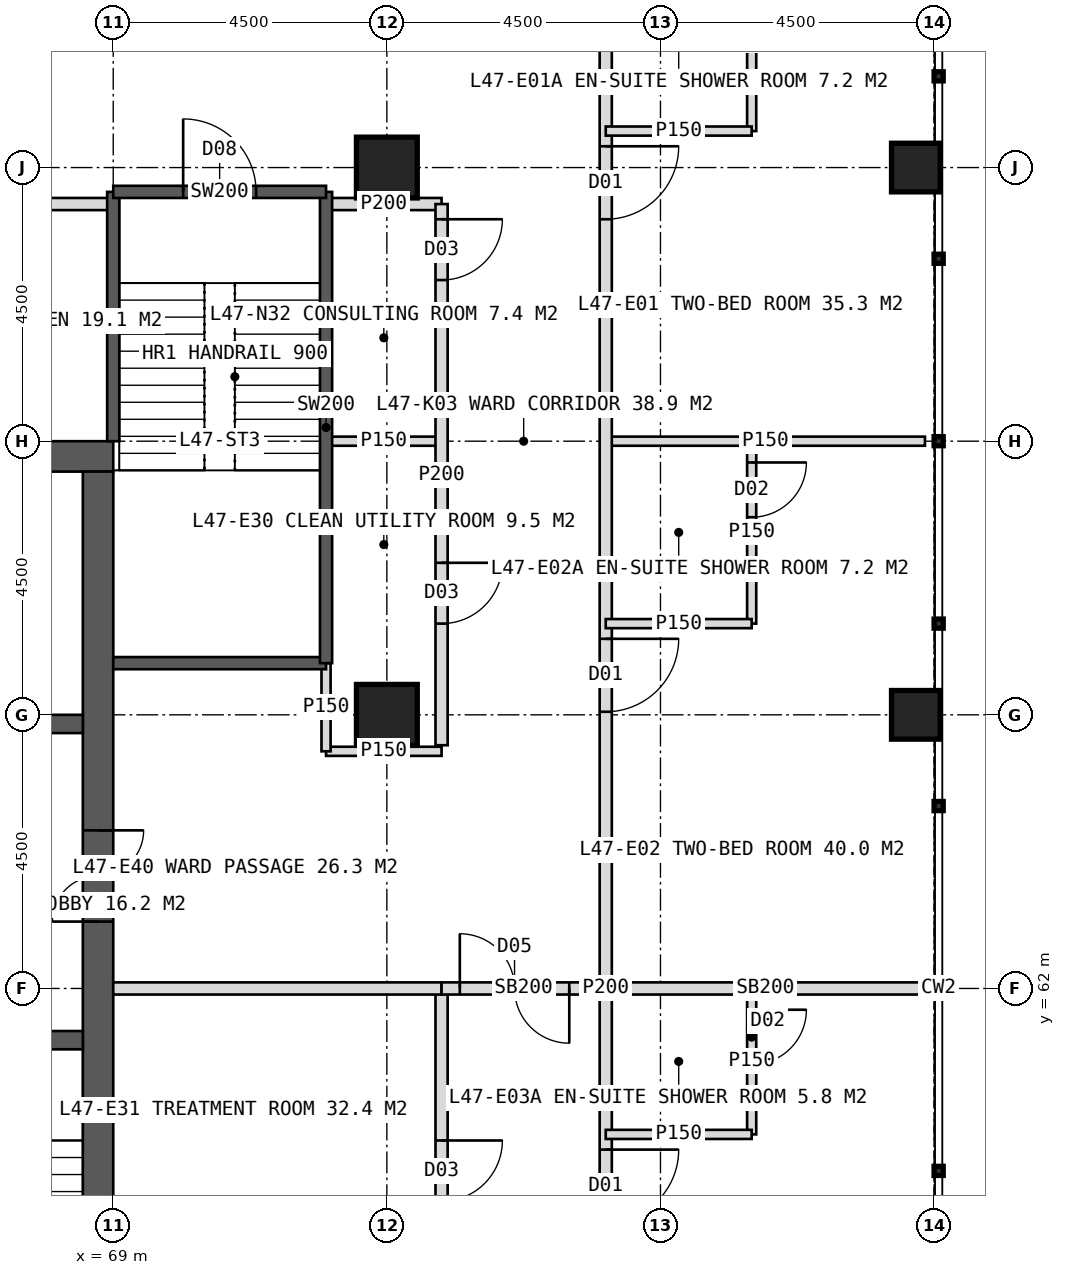
"""IFC4 building model, lengths in metres.
Left out: names, types, materials, properties, quantities, classifications, styles, units other than length and angle.
Written with IfcOpenShell. Run it as: python <this file> out.ifc"""

import sys

from ifc_helpers import new_model, si_unit, direction, frame, frame_2d, origin, origin_2d, place, context, subcontext, project, spatial, rectangle, hollow_rectangle, extrude, element, fill, save


model = new_model("IFC4")
c1 = context("Model", 3, precision=1e-05, world=origin(), true_north=direction((0.0, 1.0)))
c2 = subcontext(c1, "Body", "Model", "MODEL_VIEW")
j1 = project(units=[si_unit("LENGTHUNIT", "METRE"), si_unit("PLANEANGLEUNIT", "RADIAN")], contexts=[c1])
p1 = place(None, origin())
s1 = spatial("IfcSite", under=j1, at=p1, CompositionType="ELEMENT")
p2 = place(p1, origin())
s2 = spatial("IfcBuilding", under=s1, at=p2, CompositionType="ELEMENT")
p3 = place(p2, frame((0.0, 0.0, 197.0)))
s3 = spatial("IfcBuildingStorey", under=s2, at=p3, CompositionType="ELEMENT", Elevation=197.0)
p4 = place(p3, frame((51.0, 70.75, 0.0), z_axis=(0.0, 0.0, 1.0), x_axis=(1.0, 0.0, 0.0)))
e1 = element("IfcWall", 1, at=p4, inside=s3, PredefinedType="SHEAR", context=c2, shape_type="SweptSolid", body=[
    extrude(rectangle(XDim=18.0, YDim=0.5, at=frame_2d((9.0, 0.0))), origin(), (0.0, 0.0, 1.0), 4.0),
])
p5 = place(p4, frame((8.1, 0.0, 0.0)))
e2 = element("IfcOpeningElement", 2, at=p5, cuts=e1, PredefinedType="OPENING", context=c2, shape_type="SweptSolid", body=[
    extrude(rectangle(XDim=1.8, YDim=2.2, at=frame_2d((0.9, 1.1))), frame((0.0, 0.26, 0.0), z_axis=(0.0, -1.0, 0.0), x_axis=(1.0, 0.0, 0.0)), (0.0, 0.0, 1.0), 0.52),
])
p6 = place(p3, frame((68.75, 53.5, 0.0), z_axis=(0.0, 0.0, 1.0), x_axis=(0.0, 1.0, 0.0)))
e3 = element("IfcWall", 3, at=p6, inside=s3, PredefinedType="SHEAR", context=c2, shape_type="SweptSolid", body=[
    extrude(rectangle(XDim=17.0, YDim=0.5, at=frame_2d((8.5, 0.0))), origin(), (0.0, 0.0, 1.0), 4.0),
])
p7 = place(p6, frame((9.6, 0.0, 0.0)))
e4 = element("IfcOpeningElement", 4, at=p7, cuts=e3, PredefinedType="OPENING", context=c2, shape_type="SweptSolid", body=[
    extrude(rectangle(XDim=1.5, YDim=2.2, at=frame_2d((0.75, 1.1))), frame((0.0, 0.26, 0.0), z_axis=(0.0, -1.0, 0.0), x_axis=(1.0, 0.0, 0.0)), (0.0, 0.0, 1.0), 0.52),
])
p8 = place(p3, frame((65.2, 61.15, 0.0), z_axis=(0.0, 0.0, 1.0), x_axis=(1.0, 0.0, 0.0)))
e5 = element("IfcWall", 5, at=p8, inside=s3, PredefinedType="SHEAR", context=c2, shape_type="SweptSolid", body=[
    extrude(rectangle(XDim=3.3, YDim=0.3, at=frame_2d((1.65, 0.0))), origin(), (0.0, 0.0, 1.0), 4.0),
])
p9 = place(p8, frame((1.05, 0.0, 0.0)))
e6 = element("IfcOpeningElement", 6, at=p9, cuts=e5, PredefinedType="OPENING", context=c2, shape_type="SweptSolid", body=[
    extrude(rectangle(XDim=1.2, YDim=2.1, at=frame_2d((0.6, 1.05))), frame((0.0, 0.16, 0.0), z_axis=(0.0, -1.0, 0.0), x_axis=(1.0, 0.0, 0.0)), (0.0, 0.0, 1.0), 0.32),
])
p10 = place(p3, frame((65.2, 66.35, 0.0), z_axis=(0.0, 0.0, 1.0), x_axis=(1.0, 0.0, 0.0)))
e7 = element("IfcWall", 7, at=p10, inside=s3, PredefinedType="SHEAR", context=c2, shape_type="SweptSolid", body=[
    extrude(rectangle(XDim=3.3, YDim=0.3, at=frame_2d((1.65, 0.0))), origin(), (0.0, 0.0, 1.0), 4.0),
])
p11 = place(p10, frame((1.05, 0.0, 0.0)))
e8 = element("IfcOpeningElement", 8, at=p11, cuts=e7, PredefinedType="OPENING", context=c2, shape_type="SweptSolid", body=[
    extrude(rectangle(XDim=1.2, YDim=2.2, at=frame_2d((0.6, 1.1))), frame((0.0, 0.16, 0.0), z_axis=(0.0, -1.0, 0.0), x_axis=(1.0, 0.0, 0.0)), (0.0, 0.0, 1.0), 0.32),
])
for number, where, z_axis, x_axis in (
    (9, (73.5, 75.5, 0.0), (0.0, 0.0, 1.0), (1.0, 0.0, 0.0)),
    (10, (73.5, 66.5, 0.0), (0.0, 0.0, 1.0), (1.0, 0.0, 0.0)),
):
    element("IfcColumn", number, at=place(p3, frame(where, z_axis=z_axis, x_axis=x_axis)), inside=s3, PredefinedType="COLUMN", context=c2, shape_type="SweptSolid", body=[
        extrude(hollow_rectangle(XDim=1.0, YDim=1.0, WallThickness=0.1, at=origin_2d()), origin(), (0.0, 0.0, 1.0), 4.0),
    ])
for number, where, z_axis, x_axis in (
    (11, (82.2, 66.5, 0.0), (0.0, 0.0, 1.0), (1.0, 0.0, 0.0)),
    (12, (82.2, 75.5, 0.0), (0.0, 0.0, 1.0), (1.0, 0.0, 0.0)),
):
    element("IfcColumn", number, at=place(p3, frame(where, z_axis=z_axis, x_axis=x_axis)), inside=s3, PredefinedType="COLUMN", context=c2, shape_type="SweptSolid", body=[
        extrude(hollow_rectangle(XDim=0.8, YDim=0.8, WallThickness=0.08, at=origin_2d()), origin(), (0.0, 0.0, 1.0), 4.0),
    ])
p12 = place(p3, frame((62.25, 74.9, 0.0), z_axis=(0.0, 0.0, 1.0), x_axis=(1.0, 0.0, 0.0)))
e13 = element("IfcWall", 13, at=p12, inside=s3, PredefinedType="PARTITIONING", context=c2, shape_type="SweptSolid", body=[
    extrude(rectangle(XDim=6.75, YDim=0.2, at=frame_2d((3.375, 0.0))), origin(), (0.0, 0.0, 1.0), 3.75),
])
p13 = place(p12, frame((4.3, 0.0, 0.0)))
e14 = element("IfcOpeningElement", 14, at=p13, cuts=e13, PredefinedType="OPENING", context=c2, shape_type="SweptSolid", body=[
    extrude(rectangle(XDim=1.0, YDim=2.1, at=frame_2d((0.5, 1.05))), frame((0.0, 0.11, 0.0), z_axis=(0.0, -1.0, 0.0), x_axis=(1.0, 0.0, 0.0)), (0.0, 0.0, 1.0), 0.22),
])
p14 = place(p3, frame((72.5, 74.9, 0.0), z_axis=(0.0, 0.0, 1.0), x_axis=(1.0, 0.0, 0.0)))
e15 = element("IfcWall", 15, at=p14, inside=s3, PredefinedType="PARTITIONING", context=c2, shape_type="SweptSolid", body=[
    extrude(rectangle(XDim=1.9, YDim=0.2, at=frame_2d((0.95, 0.0))), origin(), (0.0, 0.0, 1.0), 3.75),
])
p15 = place(p3, frame((77.1, 71.0, 0.0), z_axis=(0.0, 0.0, 1.0), x_axis=(1.0, 0.0, 0.0)))
e16 = element("IfcWall", 16, at=p15, inside=s3, PredefinedType="PARTITIONING", context=c2, shape_type="SweptSolid", body=[
    extrude(rectangle(XDim=5.25, YDim=0.15, at=frame_2d((2.625, 0.0))), origin(), (0.0, 0.0, 1.0), 3.75),
])
p16 = place(p3, frame((77.1, 62.0, 0.0), z_axis=(0.0, 0.0, 1.0), x_axis=(1.0, 0.0, 0.0)))
e17 = element("IfcWall", 17, at=p16, inside=s3, PredefinedType="SOLIDWALL", context=c2, shape_type="SweptSolid", body=[
    extrude(rectangle(XDim=5.25, YDim=0.2, at=frame_2d((2.625, 0.0))), origin(), (0.0, 0.0, 1.0), 2.95),
])
p17 = place(p3, frame((77.1, 79.1, 0.0), z_axis=(0.0, 0.0, 1.0), x_axis=(0.0, -1.0, 0.0)))
e18 = element("IfcWall", 18, at=p17, inside=s3, PredefinedType="PARTITIONING", context=c2, shape_type="SweptSolid", body=[
    extrude(rectangle(XDim=34.2, YDim=0.2, at=frame_2d((17.1, 0.0))), origin(), (0.0, 0.0, 1.0), 3.75),
])
p18 = place(p17, frame((3.25, 0.0, 0.0)))
e19 = element("IfcOpeningElement", 19, at=p18, cuts=e18, PredefinedType="OPENING", context=c2, shape_type="SweptSolid", body=[
    extrude(rectangle(XDim=1.2, YDim=2.2, at=frame_2d((0.6, 1.1))), frame((0.0, 0.11, 0.0), z_axis=(0.0, -1.0, 0.0), x_axis=(1.0, 0.0, 0.0)), (0.0, 0.0, 1.0), 0.22),
])
p19 = place(p17, frame((11.35, 0.0, 0.0)))
e20 = element("IfcOpeningElement", 20, at=p19, cuts=e18, PredefinedType="OPENING", context=c2, shape_type="SweptSolid", body=[
    extrude(rectangle(XDim=1.2, YDim=2.2, at=frame_2d((0.6, 1.1))), frame((0.0, 0.11, 0.0), z_axis=(0.0, -1.0, 0.0), x_axis=(1.0, 0.0, 0.0)), (0.0, 0.0, 1.0), 0.22),
])
p20 = place(p17, frame((19.75, 0.0, 0.0)))
e21 = element("IfcOpeningElement", 21, at=p20, cuts=e18, PredefinedType="OPENING", context=c2, shape_type="SweptSolid", body=[
    extrude(rectangle(XDim=1.2, YDim=2.2, at=frame_2d((0.6, 1.1))), frame((0.0, 0.11, 0.0), z_axis=(0.0, -1.0, 0.0), x_axis=(1.0, 0.0, 0.0)), (0.0, 0.0, 1.0), 0.22),
])
p21 = place(p17, frame((25.75, 0.0, 0.0)))
e22 = element("IfcOpeningElement", 22, at=p21, cuts=e18, PredefinedType="OPENING", context=c2, shape_type="SweptSolid", body=[
    extrude(rectangle(XDim=1.2, YDim=2.2, at=frame_2d((0.6, 1.1))), frame((0.0, 0.11, 0.0), z_axis=(0.0, -1.0, 0.0), x_axis=(1.0, 0.0, 0.0)), (0.0, 0.0, 1.0), 0.22),
])
p22 = place(p3, frame((79.5, 79.1, 0.0), z_axis=(0.0, 0.0, 1.0), x_axis=(0.0, -1.0, 0.0)))
e23 = element("IfcWall", 23, at=p22, inside=s3, PredefinedType="PARTITIONING", context=c2, shape_type="SweptSolid", body=[
    extrude(rectangle(XDim=3.0, YDim=0.15, at=frame_2d((1.5, 0.0))), origin(), (0.0, 0.0, 1.0), 3.75),
])
p23 = place(p22, frame((0.35, 0.0, 0.0)))
e24 = element("IfcOpeningElement", 24, at=p23, cuts=e23, PredefinedType="OPENING", context=c2, shape_type="SweptSolid", body=[
    extrude(rectangle(XDim=0.9, YDim=2.1, at=frame_2d((0.45, 1.05))), frame((0.0, 0.085, 0.0), z_axis=(0.0, -1.0, 0.0), x_axis=(1.0, 0.0, 0.0)), (0.0, 0.0, 1.0), 0.17),
])
p24 = place(p3, frame((77.1, 76.1, 0.0), z_axis=(0.0, 0.0, 1.0), x_axis=(1.0, 0.0, 0.0)))
e25 = element("IfcWall", 25, at=p24, inside=s3, PredefinedType="PARTITIONING", context=c2, shape_type="SweptSolid", body=[
    extrude(rectangle(XDim=2.4, YDim=0.15, at=frame_2d((1.2, 0.0))), origin(), (0.0, 0.0, 1.0), 3.75),
])
p25 = place(p3, frame((79.5, 71.0, 0.0), z_axis=(0.0, 0.0, 1.0), x_axis=(0.0, -1.0, 0.0)))
e26 = element("IfcWall", 26, at=p25, inside=s3, PredefinedType="PARTITIONING", context=c2, shape_type="SweptSolid", body=[
    extrude(rectangle(XDim=3.0, YDim=0.15, at=frame_2d((1.5, 0.0))), origin(), (0.0, 0.0, 1.0), 3.75),
])
p26 = place(p25, frame((0.35, 0.0, 0.0)))
e27 = element("IfcOpeningElement", 27, at=p26, cuts=e26, PredefinedType="OPENING", context=c2, shape_type="SweptSolid", body=[
    extrude(rectangle(XDim=0.9, YDim=2.1, at=frame_2d((0.45, 1.05))), frame((0.0, 0.085, 0.0), z_axis=(0.0, -1.0, 0.0), x_axis=(1.0, 0.0, 0.0)), (0.0, 0.0, 1.0), 0.17),
])
p27 = place(p3, frame((77.1, 68.0, 0.0), z_axis=(0.0, 0.0, 1.0), x_axis=(1.0, 0.0, 0.0)))
e28 = element("IfcWall", 28, at=p27, inside=s3, PredefinedType="PARTITIONING", context=c2, shape_type="SweptSolid", body=[
    extrude(rectangle(XDim=2.4, YDim=0.15, at=frame_2d((1.2, 0.0))), origin(), (0.0, 0.0, 1.0), 3.75),
])
p28 = place(p3, frame((79.5, 62.0, 0.0), z_axis=(0.0, 0.0, 1.0), x_axis=(0.0, -1.0, 0.0)))
e29 = element("IfcWall", 29, at=p28, inside=s3, PredefinedType="PARTITIONING", context=c2, shape_type="SweptSolid", body=[
    extrude(rectangle(XDim=2.4, YDim=0.15, at=frame_2d((1.2, 0.0))), origin(), (0.0, 0.0, 1.0), 3.75),
])
p29 = place(p28, frame((0.35, 0.0, 0.0)))
e30 = element("IfcOpeningElement", 30, at=p29, cuts=e29, PredefinedType="OPENING", context=c2, shape_type="SweptSolid", body=[
    extrude(rectangle(XDim=0.9, YDim=2.1, at=frame_2d((0.45, 1.05))), frame((0.0, 0.085, 0.0), z_axis=(0.0, -1.0, 0.0), x_axis=(1.0, 0.0, 0.0)), (0.0, 0.0, 1.0), 0.17),
])
p30 = place(p3, frame((77.1, 59.6, 0.0), z_axis=(0.0, 0.0, 1.0), x_axis=(1.0, 0.0, 0.0)))
e31 = element("IfcWall", 31, at=p30, inside=s3, PredefinedType="PARTITIONING", context=c2, shape_type="SweptSolid", body=[
    extrude(rectangle(XDim=2.4, YDim=0.15, at=frame_2d((1.2, 0.0))), origin(), (0.0, 0.0, 1.0), 3.75),
])
p31 = place(p3, frame((72.5, 71.0, 0.0), z_axis=(0.0, 0.0, 1.0), x_axis=(1.0, 0.0, 0.0)))
e32 = element("IfcWall", 32, at=p31, inside=s3, PredefinedType="PARTITIONING", context=c2, shape_type="SweptSolid", body=[
    extrude(rectangle(XDim=1.9, YDim=0.15, at=frame_2d((0.95, 0.0))), origin(), (0.0, 0.0, 1.0), 3.75),
])
p32 = place(p3, frame((74.4, 74.9, 0.0), z_axis=(0.0, 0.0, 1.0), x_axis=(0.0, -1.0, 0.0)))
e33 = element("IfcWall", 33, at=p32, inside=s3, PredefinedType="PARTITIONING", context=c2, shape_type="SweptSolid", body=[
    extrude(rectangle(XDim=8.9, YDim=0.2, at=frame_2d((4.45, 0.0))), origin(), (0.0, 0.0, 1.0), 3.75),
])
p33 = place(p32, frame((0.25, 0.0, 0.0)))
e34 = element("IfcOpeningElement", 34, at=p33, cuts=e33, PredefinedType="OPENING", context=c2, shape_type="SweptSolid", body=[
    extrude(rectangle(XDim=1.0, YDim=2.1, at=frame_2d((0.5, 1.05))), frame((0.0, 0.11, 0.0), z_axis=(0.0, -1.0, 0.0), x_axis=(1.0, 0.0, 0.0)), (0.0, 0.0, 1.0), 0.22),
])
p34 = place(p32, frame((5.9, 0.0, 0.0)))
e35 = element("IfcOpeningElement", 35, at=p34, cuts=e33, PredefinedType="OPENING", context=c2, shape_type="SweptSolid", body=[
    extrude(rectangle(XDim=1.0, YDim=2.1, at=frame_2d((0.5, 1.05))), frame((0.0, 0.11, 0.0), z_axis=(0.0, -1.0, 0.0), x_axis=(1.0, 0.0, 0.0)), (0.0, 0.0, 1.0), 0.22),
])
p35 = place(p3, frame((74.4, 62.0, 0.0), z_axis=(0.0, 0.0, 1.0), x_axis=(0.0, -1.0, 0.0)))
e36 = element("IfcWall", 36, at=p35, inside=s3, PredefinedType="PARTITIONING", context=c2, shape_type="SweptSolid", body=[
    extrude(rectangle(XDim=14.4, YDim=0.2, at=frame_2d((7.2, 0.0))), origin(), (0.0, 0.0, 1.0), 3.75),
])
p36 = place(p35, frame((2.5, 0.0, 0.0)))
e37 = element("IfcOpeningElement", 37, at=p36, cuts=e36, PredefinedType="OPENING", context=c2, shape_type="SweptSolid", body=[
    extrude(rectangle(XDim=1.0, YDim=2.1, at=frame_2d((0.5, 1.05))), frame((0.0, 0.11, 0.0), z_axis=(0.0, -1.0, 0.0), x_axis=(1.0, 0.0, 0.0)), (0.0, 0.0, 1.0), 0.22),
])
p37 = place(p35, frame((7.0, 0.0, 0.0)))
e38 = element("IfcOpeningElement", 38, at=p37, cuts=e36, PredefinedType="OPENING", context=c2, shape_type="SweptSolid", body=[
    extrude(rectangle(XDim=1.0, YDim=2.1, at=frame_2d((0.5, 1.05))), frame((0.0, 0.11, 0.0), z_axis=(0.0, -1.0, 0.0), x_axis=(1.0, 0.0, 0.0)), (0.0, 0.0, 1.0), 0.22),
])
p38 = place(p35, frame((11.2, 0.0, 0.0)))
e39 = element("IfcOpeningElement", 39, at=p38, cuts=e36, PredefinedType="OPENING", context=c2, shape_type="SweptSolid", body=[
    extrude(rectangle(XDim=1.0, YDim=2.1, at=frame_2d((0.5, 1.05))), frame((0.0, 0.11, 0.0), z_axis=(0.0, -1.0, 0.0), x_axis=(1.0, 0.0, 0.0)), (0.0, 0.0, 1.0), 0.22),
])
p39 = place(p3, frame((72.5, 65.9, 0.0), z_axis=(0.0, 0.0, 1.0), x_axis=(1.0, 0.0, 0.0)))
e40 = element("IfcWall", 40, at=p39, inside=s3, PredefinedType="PARTITIONING", context=c2, shape_type="SweptSolid", body=[
    extrude(rectangle(XDim=1.9, YDim=0.15, at=frame_2d((0.95, 0.0))), origin(), (0.0, 0.0, 1.0), 3.75),
])
p40 = place(p3, frame((69.0, 62.0, 0.0), z_axis=(0.0, 0.0, 1.0), x_axis=(1.0, 0.0, 0.0)))
e41 = element("IfcWall", 41, at=p40, inside=s3, PredefinedType="SOLIDWALL", context=c2, shape_type="SweptSolid", body=[
    extrude(rectangle(XDim=5.4, YDim=0.2, at=frame_2d((2.7, 0.0))), origin(), (0.0, 0.0, 1.0), 2.95),
])
p41 = place(p3, frame((74.4, 62.0, 0.0), z_axis=(0.0, 0.0, 1.0), x_axis=(1.0, 0.0, 0.0)))
e42 = element("IfcWall", 42, at=p41, inside=s3, PredefinedType="SOLIDWALL", context=c2, shape_type="SweptSolid", body=[
    extrude(rectangle(XDim=2.7, YDim=0.2, at=frame_2d((1.35, 0.0))), origin(), (0.0, 0.0, 1.0), 2.95),
])
p42 = place(p41, frame((0.3, 0.0, 0.0)))
e43 = element("IfcOpeningElement", 43, at=p42, cuts=e42, PredefinedType="OPENING", context=c2, shape_type="SweptSolid", body=[
    extrude(rectangle(XDim=1.8, YDim=2.2, at=frame_2d((0.9, 1.1))), frame((0.0, 0.11, 0.0), z_axis=(0.0, -1.0, 0.0), x_axis=(1.0, 0.0, 0.0)), (0.0, 0.0, 1.0), 0.22),
])
p43 = place(p3, frame((72.5, 65.9, 0.0), z_axis=(0.0, 0.0, 1.0), x_axis=(0.0, 1.0, 0.0)))
e44 = element("IfcWall", 44, at=p43, inside=s3, PredefinedType="PARTITIONING", context=c2, shape_type="SweptSolid", body=[
    extrude(rectangle(XDim=1.45, YDim=0.15, at=frame_2d((0.725, 0.0))), origin(), (0.0, 0.0, 1.0), 3.75),
])
p44 = place(p3, frame((69.0, 71.0, 0.0), z_axis=(0.0, 0.0, 1.0), x_axis=(0.0, 1.0, 0.0)))
e45 = element("IfcWall", 45, at=p44, inside=s3, PredefinedType="SOLIDWALL", context=c2, shape_type="SweptSolid", body=[
    extrude(rectangle(XDim=4.1, YDim=0.2, at=frame_2d((2.05, 0.0))), origin(), (0.0, 0.0, 1.0), 3.75),
])
p45 = place(p3, frame((69.0, 67.35, 0.0), z_axis=(0.0, 0.0, 1.0), x_axis=(1.0, 0.0, 0.0)))
e46 = element("IfcWall", 46, at=p45, inside=s3, PredefinedType="SOLIDWALL", context=c2, shape_type="SweptSolid", body=[
    extrude(rectangle(XDim=3.5, YDim=0.2, at=frame_2d((1.75, 0.0))), origin(), (0.0, 0.0, 1.0), 3.75),
])
p46 = place(p3, frame((72.5, 67.35, 0.0), z_axis=(0.0, 0.0, 1.0), x_axis=(0.0, 1.0, 0.0)))
e47 = element("IfcWall", 47, at=p46, inside=s3, PredefinedType="SOLIDWALL", context=c2, shape_type="SweptSolid", body=[
    extrude(rectangle(XDim=7.75, YDim=0.2, at=frame_2d((3.875, 0.0))), origin(), (0.0, 0.0, 1.0), 3.75),
])
p47 = place(p3, frame((69.0, 75.1, 0.0), z_axis=(0.0, 0.0, 1.0), x_axis=(1.0, 0.0, 0.0)))
e48 = element("IfcWall", 48, at=p47, inside=s3, PredefinedType="SOLIDWALL", context=c2, shape_type="SweptSolid", body=[
    extrude(rectangle(XDim=3.5, YDim=0.2, at=frame_2d((1.75, 0.0))), origin(), (0.0, 0.0, 1.0), 3.75),
])
p48 = place(p47, frame((1.15, 0.0, 0.0)))
e49 = element("IfcOpeningElement", 49, at=p48, cuts=e48, PredefinedType="OPENING", context=c2, shape_type="SweptSolid", body=[
    extrude(rectangle(XDim=1.2, YDim=2.1, at=frame_2d((0.6, 1.05))), frame((0.0, 0.11, 0.0), z_axis=(0.0, -1.0, 0.0), x_axis=(1.0, 0.0, 0.0)), (0.0, 0.0, 1.0), 0.22),
])
p49 = place(p33, origin())
e50 = element("IfcDoor", 50, at=p49, inside=s3, OperationType="SINGLE_SWING_LEFT", PredefinedType="DOOR", context=c2, shape_type="SweptSolid", body=[
    extrude(rectangle(XDim=1.0, YDim=2.1, at=frame_2d((0.5, 1.05))), frame((0.0, 0.025, 0.0), z_axis=(0.0, -1.0, 0.0), x_axis=(1.0, 0.0, 0.0)), (0.0, 0.0, 1.0), 0.05),
])
fill(e34, e50)
p50 = place(p18, origin())
e51 = element("IfcDoor", 51, at=p50, inside=s3, OperationType="SINGLE_SWING_LEFT", PredefinedType="DOOR", context=c2, shape_type="SweptSolid", body=[
    extrude(rectangle(XDim=1.2, YDim=2.2, at=frame_2d((0.6, 1.1))), frame((0.0, 0.025, 0.0), z_axis=(0.0, -1.0, 0.0), x_axis=(1.0, 0.0, 0.0)), (0.0, 0.0, 1.0), 0.05),
])
fill(e19, e51)
p51 = place(p19, origin())
e52 = element("IfcDoor", 52, at=p51, inside=s3, OperationType="SINGLE_SWING_LEFT", PredefinedType="DOOR", context=c2, shape_type="SweptSolid", body=[
    extrude(rectangle(XDim=1.2, YDim=2.2, at=frame_2d((0.6, 1.1))), frame((0.0, 0.025, 0.0), z_axis=(0.0, -1.0, 0.0), x_axis=(1.0, 0.0, 0.0)), (0.0, 0.0, 1.0), 0.05),
])
fill(e20, e52)
p52 = place(p26, origin())
e53 = element("IfcDoor", 53, at=p52, inside=s3, OperationType="SINGLE_SWING_LEFT", PredefinedType="DOOR", context=c2, shape_type="SweptSolid", body=[
    extrude(rectangle(XDim=0.9, YDim=2.1, at=frame_2d((0.45, 1.05))), frame((0.0, 0.025, 0.0), z_axis=(0.0, -1.0, 0.0), x_axis=(1.0, 0.0, 0.0)), (0.0, 0.0, 1.0), 0.05),
])
fill(e27, e53)
p53 = place(p20, origin())
e54 = element("IfcDoor", 54, at=p53, inside=s3, OperationType="SINGLE_SWING_LEFT", PredefinedType="DOOR", context=c2, shape_type="SweptSolid", body=[
    extrude(rectangle(XDim=1.2, YDim=2.2, at=frame_2d((0.6, 1.1))), frame((0.0, 0.025, 0.0), z_axis=(0.0, -1.0, 0.0), x_axis=(1.0, 0.0, 0.0)), (0.0, 0.0, 1.0), 0.05),
])
fill(e21, e54)
p54 = place(p29, origin())
e55 = element("IfcDoor", 55, at=p54, inside=s3, OperationType="SINGLE_SWING_LEFT", PredefinedType="DOOR", context=c2, shape_type="SweptSolid", body=[
    extrude(rectangle(XDim=0.9, YDim=2.1, at=frame_2d((0.45, 1.05))), frame((0.0, 0.025, 0.0), z_axis=(0.0, -1.0, 0.0), x_axis=(1.0, 0.0, 0.0)), (0.0, 0.0, 1.0), 0.05),
])
fill(e30, e55)
p55 = place(p34, origin())
e56 = element("IfcDoor", 56, at=p55, inside=s3, OperationType="SINGLE_SWING_LEFT", PredefinedType="DOOR", context=c2, shape_type="SweptSolid", body=[
    extrude(rectangle(XDim=1.0, YDim=2.1, at=frame_2d((0.5, 1.05))), frame((0.0, 0.025, 0.0), z_axis=(0.0, -1.0, 0.0), x_axis=(1.0, 0.0, 0.0)), (0.0, 0.0, 1.0), 0.05),
])
fill(e35, e56)
p56 = place(p36, origin())
e57 = element("IfcDoor", 57, at=p56, inside=s3, OperationType="SINGLE_SWING_LEFT", PredefinedType="DOOR", context=c2, shape_type="SweptSolid", body=[
    extrude(rectangle(XDim=1.0, YDim=2.1, at=frame_2d((0.5, 1.05))), frame((0.0, 0.025, 0.0), z_axis=(0.0, -1.0, 0.0), x_axis=(1.0, 0.0, 0.0)), (0.0, 0.0, 1.0), 0.05),
])
fill(e37, e57)
p57 = place(p42, origin())
e58 = element("IfcDoor", 58, at=p57, inside=s3, OperationType="DOUBLE_DOOR_DOUBLE_SWING", PredefinedType="DOOR", context=c2, shape_type="SweptSolid", body=[
    extrude(rectangle(XDim=1.8, YDim=2.2, at=frame_2d((0.9, 1.1))), frame((0.0, 0.025, 0.0), z_axis=(0.0, -1.0, 0.0), x_axis=(1.0, 0.0, 0.0)), (0.0, 0.0, 1.0), 0.05),
])
fill(e43, e58)
p58 = place(p7, origin())
e59 = element("IfcDoor", 59, at=p58, inside=s3, OperationType="DOUBLE_DOOR_SINGLE_SWING", PredefinedType="DOOR", context=c2, shape_type="SweptSolid", body=[
    extrude(rectangle(XDim=1.5, YDim=2.2, at=frame_2d((0.75, 1.1))), frame((0.0, 0.025, 0.0), z_axis=(0.0, -1.0, 0.0), x_axis=(1.0, 0.0, 0.0)), (0.0, 0.0, 1.0), 0.05),
])
fill(e4, e59)
p59 = place(p48, origin())
e60 = element("IfcDoor", 60, at=p59, inside=s3, OperationType="SINGLE_SWING_LEFT", PredefinedType="DOOR", context=c2, shape_type="SweptSolid", body=[
    extrude(rectangle(XDim=1.2, YDim=2.1, at=frame_2d((0.6, 1.05))), frame((0.0, 0.025, 0.0), z_axis=(0.0, -1.0, 0.0), x_axis=(1.0, 0.0, 0.0)), (0.0, 0.0, 1.0), 0.05),
])
fill(e49, e60)
save(model, sys.argv[1])
